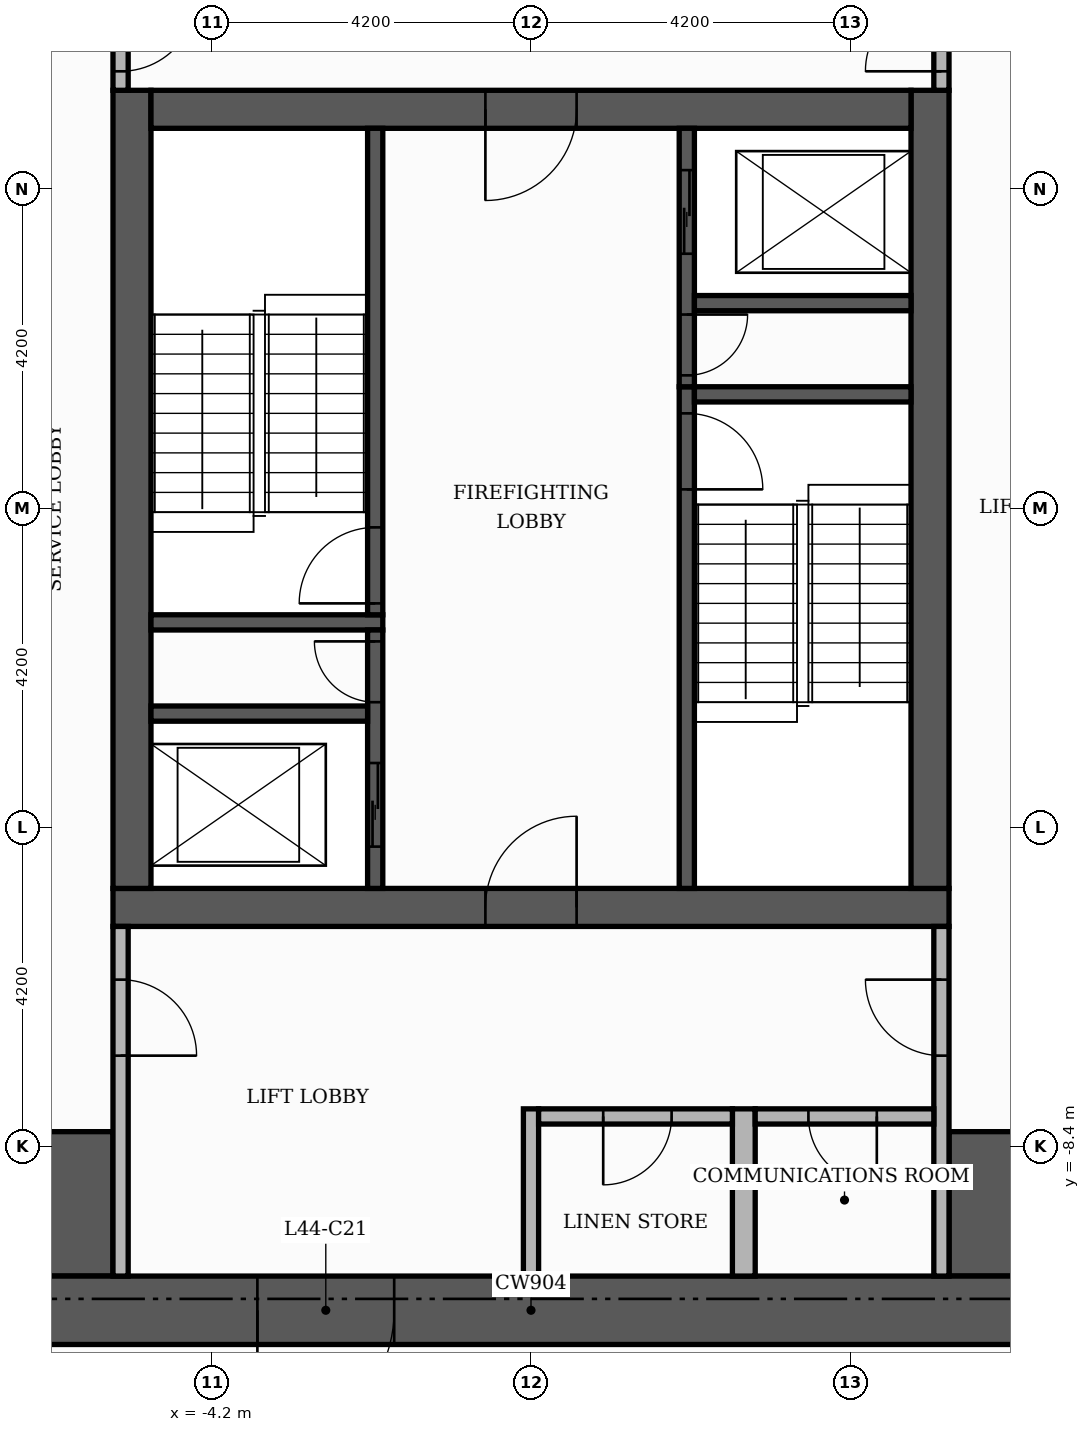
"""IFC4 building model, lengths in metres.
Left out: names, types, materials, properties, quantities, classifications, styles, units other than length and angle.
Written with IfcOpenShell. Run it as: python <this file> out.ifc"""

import sys

from ifc_helpers import new_model, si_unit, direction, frame, frame_2d, origin, place, context, subcontext, project, spatial, rectangle, extrude, element, fill, save


model = new_model("IFC4")
c1 = context("Model", 3, precision=1e-05, world=origin(), true_north=direction((0.0, 1.0)))
c2 = subcontext(c1, "Body", "Model", "MODEL_VIEW")
j1 = project(units=[si_unit("LENGTHUNIT", "METRE"), si_unit("PLANEANGLEUNIT", "RADIAN")], contexts=[c1])
p1 = place(None, origin())
s1 = spatial("IfcSite", under=j1, at=p1, CompositionType="ELEMENT")
p2 = place(p1, origin())
s2 = spatial("IfcBuilding", under=s1, at=p2, CompositionType="ELEMENT")
p3 = place(p2, frame((0.0, 0.0, 188.4)))
s3 = spatial("IfcBuildingStorey", under=s2, at=p3, CompositionType="ELEMENT", Elevation=188.4)
p4 = place(p3, frame((-5.5, -5.25, 0.0), z_axis=(0.0, 0.0, 1.0), x_axis=(1.0, 0.0, 0.0)))
e1 = element("IfcWall", 1, at=p4, inside=s3, PredefinedType="SHEAR", context=c2, shape_type="SweptSolid", body=[
    extrude(rectangle(XDim=11.0, YDim=0.5, at=frame_2d((5.5, 0.0))), origin(), (0.0, 0.0, 1.0), 3.48),
])
p5 = place(p4, frame((4.9, 0.0, 0.0)))
e2 = element("IfcOpeningElement", 2, at=p5, cuts=e1, PredefinedType="OPENING", context=c2, shape_type="SweptSolid", body=[
    extrude(rectangle(XDim=1.2, YDim=2.1, at=frame_2d((0.6, 1.05))), frame((0.0, 0.26, 0.0), z_axis=(0.0, -1.0, 0.0), x_axis=(1.0, 0.0, 0.0)), (0.0, 0.0, 1.0), 0.52),
])
for number, where, z_axis, x_axis in (
    (3, (-5.25, -5.0, 0.0), (0.0, 0.0, 1.0), (0.0, 1.0, 0.0)),
    (4, (5.25, -5.0, 0.0), (0.0, 0.0, 1.0), (0.0, 1.0, 0.0)),
):
    element("IfcWall", number, at=place(p3, frame(where, z_axis=z_axis, x_axis=x_axis)), inside=s3, PredefinedType="SHEAR", context=c2, shape_type="SweptSolid", body=[
        extrude(rectangle(XDim=10.5, YDim=0.5, at=frame_2d((5.25, 0.0))), origin(), (0.0, 0.0, 1.0), 3.48),
    ])
p6 = place(p3, frame((-5.0, 5.25, 0.0), z_axis=(0.0, 0.0, 1.0), x_axis=(1.0, 0.0, 0.0)))
e5 = element("IfcWall", 5, at=p6, inside=s3, PredefinedType="SHEAR", context=c2, shape_type="SweptSolid", body=[
    extrude(rectangle(XDim=10.0, YDim=0.5, at=frame_2d((5.0, 0.0))), origin(), (0.0, 0.0, 1.0), 3.48),
])
p7 = place(p6, frame((4.4, 0.0, 0.0)))
e6 = element("IfcOpeningElement", 6, at=p7, cuts=e5, PredefinedType="OPENING", context=c2, shape_type="SweptSolid", body=[
    extrude(rectangle(XDim=1.2, YDim=2.1, at=frame_2d((0.6, 1.05))), frame((0.0, 0.26, 0.0), z_axis=(0.0, -1.0, 0.0), x_axis=(1.0, 0.0, 0.0)), (0.0, 0.0, 1.0), 0.52),
])
for number, where, z_axis, x_axis in (
    (7, (-10.1, -9.15, 0.0), (0.0, 0.0, 1.0), (1.0, 0.0, 0.0)),
    (8, (5.5, -9.15, 0.0), (0.0, 0.0, 1.0), (1.0, 0.0, 0.0)),
):
    element("IfcWall", number, at=place(p3, frame(where, z_axis=z_axis, x_axis=x_axis)), inside=s3, PredefinedType="SHEAR", context=c2, shape_type="SweptSolid", body=[
        extrude(rectangle(XDim=4.6, YDim=1.9, at=frame_2d((2.3, 0.0))), origin(), (0.0, 0.0, 1.0), 3.48),
    ])
p8 = place(p3, frame((2.05, -5.0, 0.0), z_axis=(0.0, 0.0, 1.0), x_axis=(0.0, 1.0, 0.0)))
e9 = element("IfcWall", 9, at=p8, inside=s3, PredefinedType="SHEAR", context=c2, shape_type="SweptSolid", body=[
    extrude(rectangle(XDim=6.6, YDim=0.2, at=frame_2d((3.3, 0.0))), origin(), (0.0, 0.0, 1.0), 3.48),
])
p9 = place(p8, frame((5.25, 0.0, 0.0)))
e10 = element("IfcOpeningElement", 10, at=p9, cuts=e9, PredefinedType="OPENING", context=c2, shape_type="SweptSolid", body=[
    extrude(rectangle(XDim=1.0, YDim=2.1, at=frame_2d((0.5, 1.05))), frame((0.0, 0.11, 0.0), z_axis=(0.0, -1.0, 0.0), x_axis=(1.0, 0.0, 0.0)), (0.0, 0.0, 1.0), 0.22),
])
p10 = place(p3, frame((-5.0, -1.5, 0.0), z_axis=(0.0, 0.0, 1.0), x_axis=(1.0, 0.0, 0.0)))
e11 = element("IfcWall", 11, at=p10, inside=s3, PredefinedType="SHEAR", context=c2, shape_type="SweptSolid", body=[
    extrude(rectangle(XDim=3.05, YDim=0.2, at=frame_2d((1.525, 0.0))), origin(), (0.0, 0.0, 1.0), 3.48),
])
p11 = place(p3, frame((-2.05, -1.4, 0.0), z_axis=(0.0, 0.0, 1.0), x_axis=(0.0, 1.0, 0.0)))
e12 = element("IfcWall", 12, at=p11, inside=s3, PredefinedType="SHEAR", context=c2, shape_type="SweptSolid", body=[
    extrude(rectangle(XDim=6.4, YDim=0.2, at=frame_2d((3.2, 0.0))), origin(), (0.0, 0.0, 1.0), 3.48),
])
p12 = place(p11, frame((0.15, 0.0, 0.0)))
e13 = element("IfcOpeningElement", 13, at=p12, cuts=e12, PredefinedType="OPENING", context=c2, shape_type="SweptSolid", body=[
    extrude(rectangle(XDim=1.0, YDim=2.1, at=frame_2d((0.5, 1.05))), frame((0.0, 0.11, 0.0), z_axis=(0.0, -1.0, 0.0), x_axis=(1.0, 0.0, 0.0)), (0.0, 0.0, 1.0), 0.22),
])
p13 = place(p3, frame((2.15, 1.5, 0.0), z_axis=(0.0, 0.0, 1.0), x_axis=(1.0, 0.0, 0.0)))
e14 = element("IfcWall", 14, at=p13, inside=s3, PredefinedType="SHEAR", context=c2, shape_type="SweptSolid", body=[
    extrude(rectangle(XDim=2.85, YDim=0.2, at=frame_2d((1.425, 0.0))), origin(), (0.0, 0.0, 1.0), 3.48),
])
p14 = place(p3, frame((-2.05, -5.0, 0.0), z_axis=(0.0, 0.0, 1.0), x_axis=(0.0, 1.0, 0.0)))
e15 = element("IfcWall", 15, at=p14, inside=s3, PredefinedType="SHEAR", context=c2, shape_type="SweptSolid", body=[
    extrude(rectangle(XDim=3.4, YDim=0.2, at=frame_2d((1.7, 0.0))), origin(), (0.0, 0.0, 1.0), 3.48),
])
p15 = place(p14, frame((0.55, 0.0, 0.0)))
e16 = element("IfcOpeningElement", 16, at=p15, cuts=e15, PredefinedType="OPENING", context=c2, shape_type="SweptSolid", body=[
    extrude(rectangle(XDim=1.1, YDim=2.1, at=frame_2d((0.55, 1.05))), frame((0.0, 0.11, 0.0), z_axis=(0.0, -1.0, 0.0), x_axis=(1.0, 0.0, 0.0)), (0.0, 0.0, 1.0), 0.22),
])
p16 = place(p14, frame((2.45, 0.0, 0.0)))
e17 = element("IfcOpeningElement", 17, at=p16, cuts=e15, PredefinedType="OPENING", context=c2, shape_type="SweptSolid", body=[
    extrude(rectangle(XDim=0.8, YDim=2.1, at=frame_2d((0.4, 1.05))), frame((0.0, 0.11, 0.0), z_axis=(0.0, -1.0, 0.0), x_axis=(1.0, 0.0, 0.0)), (0.0, 0.0, 1.0), 0.22),
])
p17 = place(p3, frame((-5.0, -2.7, 0.0), z_axis=(0.0, 0.0, 1.0), x_axis=(1.0, 0.0, 0.0)))
e18 = element("IfcWall", 18, at=p17, inside=s3, PredefinedType="SHEAR", context=c2, shape_type="SweptSolid", body=[
    extrude(rectangle(XDim=2.85, YDim=0.2, at=frame_2d((1.425, 0.0))), origin(), (0.0, 0.0, 1.0), 3.48),
])
p18 = place(p3, frame((2.05, 1.6, 0.0), z_axis=(0.0, 0.0, 1.0), x_axis=(0.0, 1.0, 0.0)))
e19 = element("IfcWall", 19, at=p18, inside=s3, PredefinedType="SHEAR", context=c2, shape_type="SweptSolid", body=[
    extrude(rectangle(XDim=3.4, YDim=0.2, at=frame_2d((1.7, 0.0))), origin(), (0.0, 0.0, 1.0), 3.48),
])
p19 = place(p18, frame((1.75, 0.0, 0.0)))
e20 = element("IfcOpeningElement", 20, at=p19, cuts=e19, PredefinedType="OPENING", context=c2, shape_type="SweptSolid", body=[
    extrude(rectangle(XDim=1.1, YDim=2.1, at=frame_2d((0.55, 1.05))), frame((0.0, 0.11, 0.0), z_axis=(0.0, -1.0, 0.0), x_axis=(1.0, 0.0, 0.0)), (0.0, 0.0, 1.0), 0.22),
])
p20 = place(p18, frame((0.15, 0.0, 0.0)))
e21 = element("IfcOpeningElement", 21, at=p20, cuts=e19, PredefinedType="OPENING", context=c2, shape_type="SweptSolid", body=[
    extrude(rectangle(XDim=0.8, YDim=2.1, at=frame_2d((0.4, 1.05))), frame((0.0, 0.11, 0.0), z_axis=(0.0, -1.0, 0.0), x_axis=(1.0, 0.0, 0.0)), (0.0, 0.0, 1.0), 0.22),
])
p21 = place(p3, frame((2.15, 2.7, 0.0), z_axis=(0.0, 0.0, 1.0), x_axis=(1.0, 0.0, 0.0)))
e22 = element("IfcWall", 22, at=p21, inside=s3, PredefinedType="SHEAR", context=c2, shape_type="SweptSolid", body=[
    extrude(rectangle(XDim=2.85, YDim=0.2, at=frame_2d((1.425, 0.0))), origin(), (0.0, 0.0, 1.0), 3.48),
])
p22 = place(p3, frame((-11.0, -10.55, 0.0), z_axis=(0.0, 0.0, 1.0), x_axis=(1.0, 0.0, 0.0)))
e23 = element("IfcWall", 23, at=p22, inside=s3, PredefinedType="SHEAR", context=c2, shape_type="SweptSolid", body=[
    extrude(rectangle(XDim=22.0, YDim=0.9, at=frame_2d((11.0, 0.0))), origin(), (0.0, 0.0, 1.0), 3.48),
])
p23 = place(p22, frame((7.4, 0.0, 0.0)))
e24 = element("IfcOpeningElement", 24, at=p23, cuts=e23, PredefinedType="OPENING", context=c2, shape_type="SweptSolid", body=[
    extrude(rectangle(XDim=1.8, YDim=2.2, at=frame_2d((0.9, 1.1))), frame((0.0, 0.46, 0.0), z_axis=(0.0, -1.0, 0.0), x_axis=(1.0, 0.0, 0.0)), (0.0, 0.0, 1.0), 0.92),
])
p24 = place(p3, frame((-5.4, -10.1, 0.0), z_axis=(0.0, 0.0, 1.0), x_axis=(0.0, 1.0, 0.0)))
e25 = element("IfcWall", 25, at=p24, inside=s3, PredefinedType="PARTITIONING", context=c2, shape_type="SweptSolid", body=[
    extrude(rectangle(XDim=4.6, YDim=0.2, at=frame_2d((2.3, 0.0))), origin(), (0.0, 0.0, 1.0), 3.48),
])
p25 = place(p24, frame((2.9, 0.0, 0.0)))
e26 = element("IfcOpeningElement", 26, at=p25, cuts=e25, PredefinedType="OPENING", context=c2, shape_type="SweptSolid", body=[
    extrude(rectangle(XDim=1.0, YDim=2.1, at=frame_2d((0.5, 1.05))), frame((0.0, 0.11, 0.0), z_axis=(0.0, -1.0, 0.0), x_axis=(1.0, 0.0, 0.0)), (0.0, 0.0, 1.0), 0.22),
])
p26 = place(p3, frame((0.0, -10.1, 0.0), z_axis=(0.0, 0.0, 1.0), x_axis=(0.0, 1.0, 0.0)))
e27 = element("IfcWall", 27, at=p26, inside=s3, PredefinedType="PARTITIONING", context=c2, shape_type="SweptSolid", body=[
    extrude(rectangle(XDim=2.2, YDim=0.2, at=frame_2d((1.1, 0.0))), origin(), (0.0, 0.0, 1.0), 3.48),
])
p27 = place(p3, frame((2.8, -10.1, 0.0), z_axis=(0.0, 0.0, 1.0), x_axis=(0.0, 1.0, 0.0)))
e28 = element("IfcWall", 28, at=p27, inside=s3, PredefinedType="PARTITIONING", context=c2, shape_type="SweptSolid", body=[
    extrude(rectangle(XDim=2.2, YDim=0.3, at=frame_2d((1.1, 0.0))), origin(), (0.0, 0.0, 1.0), 3.48),
])
p28 = place(p3, frame((5.4, -10.1, 0.0), z_axis=(0.0, 0.0, 1.0), x_axis=(0.0, 1.0, 0.0)))
e29 = element("IfcWall", 29, at=p28, inside=s3, PredefinedType="PARTITIONING", context=c2, shape_type="SweptSolid", body=[
    extrude(rectangle(XDim=4.6, YDim=0.2, at=frame_2d((2.3, 0.0))), origin(), (0.0, 0.0, 1.0), 3.48),
])
p29 = place(p28, frame((2.9, 0.0, 0.0)))
e30 = element("IfcOpeningElement", 30, at=p29, cuts=e29, PredefinedType="OPENING", context=c2, shape_type="SweptSolid", body=[
    extrude(rectangle(XDim=1.0, YDim=2.1, at=frame_2d((0.5, 1.05))), frame((0.0, 0.11, 0.0), z_axis=(0.0, -1.0, 0.0), x_axis=(1.0, 0.0, 0.0)), (0.0, 0.0, 1.0), 0.22),
])
p30 = place(p3, frame((0.1, -8.0, 0.0), z_axis=(0.0, 0.0, 1.0), x_axis=(1.0, 0.0, 0.0)))
e31 = element("IfcWall", 31, at=p30, inside=s3, PredefinedType="PARTITIONING", context=c2, shape_type="SweptSolid", body=[
    extrude(rectangle(XDim=2.55, YDim=0.2, at=frame_2d((1.275, 0.0))), origin(), (0.0, 0.0, 1.0), 3.48),
])
p31 = place(p30, frame((0.85, 0.0, 0.0)))
e32 = element("IfcOpeningElement", 32, at=p31, cuts=e31, PredefinedType="OPENING", context=c2, shape_type="SweptSolid", body=[
    extrude(rectangle(XDim=0.9, YDim=2.1, at=frame_2d((0.45, 1.05))), frame((0.0, 0.11, 0.0), z_axis=(0.0, -1.0, 0.0), x_axis=(1.0, 0.0, 0.0)), (0.0, 0.0, 1.0), 0.22),
])
p32 = place(p3, frame((2.95, -8.0, 0.0), z_axis=(0.0, 0.0, 1.0), x_axis=(1.0, 0.0, 0.0)))
e33 = element("IfcWall", 33, at=p32, inside=s3, PredefinedType="PARTITIONING", context=c2, shape_type="SweptSolid", body=[
    extrude(rectangle(XDim=2.35, YDim=0.2, at=frame_2d((1.175, 0.0))), origin(), (0.0, 0.0, 1.0), 3.48),
])
p33 = place(p32, frame((0.7, 0.0, 0.0)))
e34 = element("IfcOpeningElement", 34, at=p33, cuts=e33, PredefinedType="OPENING", context=c2, shape_type="SweptSolid", body=[
    extrude(rectangle(XDim=0.9, YDim=2.1, at=frame_2d((0.45, 1.05))), frame((0.0, 0.11, 0.0), z_axis=(0.0, -1.0, 0.0), x_axis=(1.0, 0.0, 0.0)), (0.0, 0.0, 1.0), 0.22),
])
p34 = place(p3, frame((-5.4, 5.5, 0.0), z_axis=(0.0, 0.0, 1.0), x_axis=(0.0, 1.0, 0.0)))
e35 = element("IfcWall", 35, at=p34, inside=s3, PredefinedType="PARTITIONING", context=c2, shape_type="SweptSolid", body=[
    extrude(rectangle(XDim=1.55, YDim=0.2, at=frame_2d((0.775, 0.0))), origin(), (0.0, 0.0, 1.0), 3.48),
])
p35 = place(p34, frame((0.25, 0.0, 0.0)))
e36 = element("IfcOpeningElement", 36, at=p35, cuts=e35, PredefinedType="OPENING", context=c2, shape_type="SweptSolid", body=[
    extrude(rectangle(XDim=1.0, YDim=2.1, at=frame_2d((0.5, 1.05))), frame((0.0, 0.11, 0.0), z_axis=(0.0, -1.0, 0.0), x_axis=(1.0, 0.0, 0.0)), (0.0, 0.0, 1.0), 0.22),
])
p36 = place(p3, frame((5.4, 5.5, 0.0), z_axis=(0.0, 0.0, 1.0), x_axis=(0.0, 1.0, 0.0)))
e37 = element("IfcWall", 37, at=p36, inside=s3, PredefinedType="PARTITIONING", context=c2, shape_type="SweptSolid", body=[
    extrude(rectangle(XDim=4.6, YDim=0.2, at=frame_2d((2.3, 0.0))), origin(), (0.0, 0.0, 1.0), 3.48),
])
p37 = place(p36, frame((0.25, 0.0, 0.0)))
e38 = element("IfcOpeningElement", 38, at=p37, cuts=e37, PredefinedType="OPENING", context=c2, shape_type="SweptSolid", body=[
    extrude(rectangle(XDim=1.0, YDim=2.1, at=frame_2d((0.5, 1.05))), frame((0.0, 0.11, 0.0), z_axis=(0.0, -1.0, 0.0), x_axis=(1.0, 0.0, 0.0)), (0.0, 0.0, 1.0), 0.22),
])
p38 = place(p19, origin())
e39 = element("IfcDoor", 39, at=p38, inside=s3, OperationType="SLIDING_TO_LEFT", PredefinedType="DOOR", context=c2, shape_type="SweptSolid", body=[
    extrude(rectangle(XDim=1.1, YDim=2.1, at=frame_2d((0.55, 1.05))), frame((0.0, 0.025, 0.0), z_axis=(0.0, -1.0, 0.0), x_axis=(1.0, 0.0, 0.0)), (0.0, 0.0, 1.0), 0.05),
])
fill(e20, e39)
p39 = place(p15, origin())
e40 = element("IfcDoor", 40, at=p39, inside=s3, OperationType="SLIDING_TO_LEFT", PredefinedType="DOOR", context=c2, shape_type="SweptSolid", body=[
    extrude(rectangle(XDim=1.1, YDim=2.1, at=frame_2d((0.55, 1.05))), frame((0.0, 0.025, 0.0), z_axis=(0.0, -1.0, 0.0), x_axis=(1.0, 0.0, 0.0)), (0.0, 0.0, 1.0), 0.05),
])
fill(e16, e40)
p40 = place(p12, origin())
e41 = element("IfcDoor", 41, at=p40, inside=s3, OperationType="SINGLE_SWING_LEFT", PredefinedType="DOOR", context=c2, shape_type="SweptSolid", body=[
    extrude(rectangle(XDim=1.0, YDim=2.1, at=frame_2d((0.5, 1.05))), frame((0.0, 0.025, 0.0), z_axis=(0.0, -1.0, 0.0), x_axis=(1.0, 0.0, 0.0)), (0.0, 0.0, 1.0), 0.05),
])
fill(e13, e41)
p41 = place(p9, frame((1.0, 0.0, 0.0), z_axis=(0.0, 0.0, 1.0), x_axis=(-1.0, 0.0, 0.0)))
e42 = element("IfcDoor", 42, at=p41, inside=s3, OperationType="SINGLE_SWING_LEFT", PredefinedType="DOOR", context=c2, shape_type="SweptSolid", body=[
    extrude(rectangle(XDim=1.0, YDim=2.1, at=frame_2d((0.5, 1.05))), frame((0.0, 0.025, 0.0), z_axis=(0.0, -1.0, 0.0), x_axis=(1.0, 0.0, 0.0)), (0.0, 0.0, 1.0), 0.05),
])
fill(e10, e42)
p42 = place(p20, frame((0.8, 0.0, 0.0), z_axis=(0.0, 0.0, 1.0), x_axis=(-1.0, 0.0, 0.0)))
e43 = element("IfcDoor", 43, at=p42, inside=s3, OperationType="SINGLE_SWING_RIGHT", PredefinedType="DOOR", context=c2, shape_type="SweptSolid", body=[
    extrude(rectangle(XDim=0.8, YDim=2.1, at=frame_2d((0.4, 1.05))), frame((0.0, 0.025, 0.0), z_axis=(0.0, -1.0, 0.0), x_axis=(1.0, 0.0, 0.0)), (0.0, 0.0, 1.0), 0.05),
])
fill(e21, e43)
p43 = place(p16, origin())
e44 = element("IfcDoor", 44, at=p43, inside=s3, OperationType="SINGLE_SWING_RIGHT", PredefinedType="DOOR", context=c2, shape_type="SweptSolid", body=[
    extrude(rectangle(XDim=0.8, YDim=2.1, at=frame_2d((0.4, 1.05))), frame((0.0, 0.025, 0.0), z_axis=(0.0, -1.0, 0.0), x_axis=(1.0, 0.0, 0.0)), (0.0, 0.0, 1.0), 0.05),
])
fill(e17, e44)
p44 = place(p7, frame((1.2, 0.0, 0.0), z_axis=(0.0, 0.0, 1.0), x_axis=(-1.0, 0.0, 0.0)))
e45 = element("IfcDoor", 45, at=p44, inside=s3, OperationType="SINGLE_SWING_LEFT", PredefinedType="DOOR", context=c2, shape_type="SweptSolid", body=[
    extrude(rectangle(XDim=1.2, YDim=2.1, at=frame_2d((0.6, 1.05))), frame((0.0, 0.025, 0.0), z_axis=(0.0, -1.0, 0.0), x_axis=(1.0, 0.0, 0.0)), (0.0, 0.0, 1.0), 0.05),
])
fill(e6, e45)
p45 = place(p5, origin())
e46 = element("IfcDoor", 46, at=p45, inside=s3, OperationType="SINGLE_SWING_RIGHT", PredefinedType="DOOR", context=c2, shape_type="SweptSolid", body=[
    extrude(rectangle(XDim=1.2, YDim=2.1, at=frame_2d((0.6, 1.05))), frame((0.0, 0.025, 0.0), z_axis=(0.0, -1.0, 0.0), x_axis=(1.0, 0.0, 0.0)), (0.0, 0.0, 1.0), 0.05),
])
fill(e2, e46)
p46 = place(p35, frame((1.0, 0.0, 0.0), z_axis=(0.0, 0.0, 1.0), x_axis=(-1.0, 0.0, 0.0)))
e47 = element("IfcDoor", 47, at=p46, inside=s3, OperationType="SINGLE_SWING_RIGHT", PredefinedType="DOOR", context=c2, shape_type="SweptSolid", body=[
    extrude(rectangle(XDim=1.0, YDim=2.1, at=frame_2d((0.5, 1.05))), frame((0.0, 0.025, 0.0), z_axis=(0.0, -1.0, 0.0), x_axis=(1.0, 0.0, 0.0)), (0.0, 0.0, 1.0), 0.05),
])
fill(e36, e47)
p47 = place(p37, origin())
e48 = element("IfcDoor", 48, at=p47, inside=s3, OperationType="SINGLE_SWING_LEFT", PredefinedType="DOOR", context=c2, shape_type="SweptSolid", body=[
    extrude(rectangle(XDim=1.0, YDim=2.1, at=frame_2d((0.5, 1.05))), frame((0.0, 0.025, 0.0), z_axis=(0.0, -1.0, 0.0), x_axis=(1.0, 0.0, 0.0)), (0.0, 0.0, 1.0), 0.05),
])
fill(e38, e48)
p48 = place(p25, frame((1.0, 0.0, 0.0), z_axis=(0.0, 0.0, 1.0), x_axis=(-1.0, 0.0, 0.0)))
e49 = element("IfcDoor", 49, at=p48, inside=s3, OperationType="SINGLE_SWING_LEFT", PredefinedType="DOOR", context=c2, shape_type="SweptSolid", body=[
    extrude(rectangle(XDim=1.0, YDim=2.1, at=frame_2d((0.5, 1.05))), frame((0.0, 0.025, 0.0), z_axis=(0.0, -1.0, 0.0), x_axis=(1.0, 0.0, 0.0)), (0.0, 0.0, 1.0), 0.05),
])
fill(e26, e49)
p49 = place(p29, origin())
e50 = element("IfcDoor", 50, at=p49, inside=s3, OperationType="SINGLE_SWING_RIGHT", PredefinedType="DOOR", context=c2, shape_type="SweptSolid", body=[
    extrude(rectangle(XDim=1.0, YDim=2.1, at=frame_2d((0.5, 1.05))), frame((0.0, 0.025, 0.0), z_axis=(0.0, -1.0, 0.0), x_axis=(1.0, 0.0, 0.0)), (0.0, 0.0, 1.0), 0.05),
])
fill(e30, e50)
p50 = place(p23, frame((1.8, 0.0, 0.0), z_axis=(0.0, 0.0, 1.0), x_axis=(-1.0, 0.0, 0.0)))
e51 = element("IfcDoor", 51, at=p50, inside=s3, OperationType="DOUBLE_DOOR_SINGLE_SWING", PredefinedType="DOOR", context=c2, shape_type="SweptSolid", body=[
    extrude(rectangle(XDim=1.8, YDim=2.2, at=frame_2d((0.9, 1.1))), frame((0.0, 0.025, 0.0), z_axis=(0.0, -1.0, 0.0), x_axis=(1.0, 0.0, 0.0)), (0.0, 0.0, 1.0), 0.05),
])
fill(e24, e51)
p51 = place(p31, frame((0.9, 0.0, 0.0), z_axis=(0.0, 0.0, 1.0), x_axis=(-1.0, 0.0, 0.0)))
e52 = element("IfcDoor", 52, at=p51, inside=s3, OperationType="SINGLE_SWING_LEFT", PredefinedType="DOOR", context=c2, shape_type="SweptSolid", body=[
    extrude(rectangle(XDim=0.9, YDim=2.1, at=frame_2d((0.45, 1.05))), frame((0.0, 0.025, 0.0), z_axis=(0.0, -1.0, 0.0), x_axis=(1.0, 0.0, 0.0)), (0.0, 0.0, 1.0), 0.05),
])
fill(e32, e52)
p52 = place(p33, frame((0.9, 0.0, 0.0), z_axis=(0.0, 0.0, 1.0), x_axis=(-1.0, 0.0, 0.0)))
e53 = element("IfcDoor", 53, at=p52, inside=s3, OperationType="SINGLE_SWING_RIGHT", PredefinedType="DOOR", context=c2, shape_type="SweptSolid", body=[
    extrude(rectangle(XDim=0.9, YDim=2.1, at=frame_2d((0.45, 1.05))), frame((0.0, 0.025, 0.0), z_axis=(0.0, -1.0, 0.0), x_axis=(1.0, 0.0, 0.0)), (0.0, 0.0, 1.0), 0.05),
])
fill(e34, e53)
save(model, sys.argv[1])
